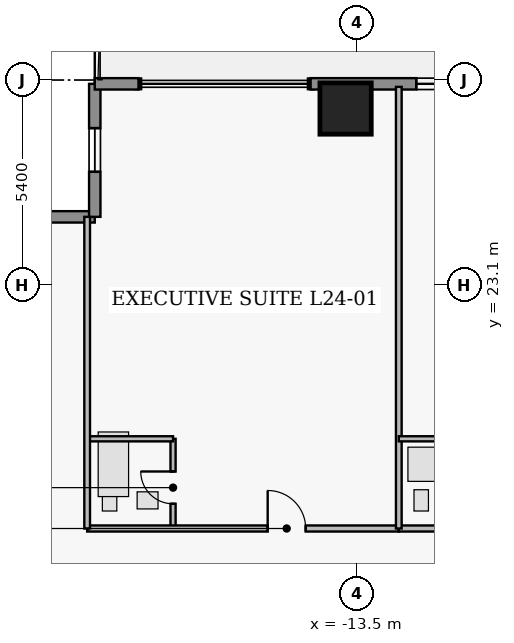
"""IFC4 building model, lengths in metres.
Left out: names, types, materials, properties, quantities, classifications, styles, units other than length and angle.
Written with IfcOpenShell. Run it as: python <this file> out.ifc"""

import sys

from ifc_helpers import new_model, si_unit, direction, frame, frame_2d, origin, origin_2d, place, context, subcontext, project, spatial, rectangle, extrude, element, fill, save


model = new_model("IFC4")
c1 = context("Model", 3, precision=1e-05, world=origin(), true_north=direction((0.0, 1.0)))
c2 = subcontext(c1, "Body", "Model", "MODEL_VIEW")
j1 = project(units=[si_unit("LENGTHUNIT", "METRE"), si_unit("PLANEANGLEUNIT", "RADIAN")], contexts=[c1])
p1 = place(None, origin())
s1 = spatial("IfcSite", under=j1, at=p1, CompositionType="ELEMENT")
p2 = place(p1, origin())
s2 = spatial("IfcBuilding", under=s1, at=p2, CompositionType="ELEMENT")
p3 = place(p2, frame((0.0, 0.0, 99.3)))
s3 = spatial("IfcBuildingStorey", under=s2, at=p3, CompositionType="ELEMENT", Elevation=99.3)
p4 = place(p3, frame((-13.8, 27.75, 0.0), z_axis=(0.0, 0.0, 1.0), x_axis=(1.0, 0.0, 0.0)))
e1 = element("IfcColumn", 1, at=p4, inside=s3, PredefinedType="COLUMN", context=c2, shape_type="SweptSolid", body=[
    extrude(rectangle(XDim=1.35, YDim=1.35, at=origin_2d()), origin(), (0.0, 0.0, 1.0), 3.65),
])
p5 = place(p3, frame((-23.9, 24.9, 0.0), z_axis=(0.0, 0.0, 1.0), x_axis=(1.0, 0.0, 0.0)))
e2 = element("IfcWall", 2, at=p5, inside=s3, PredefinedType="STANDARD", context=c2, shape_type="SweptSolid", body=[
    extrude(rectangle(XDim=3.5, YDim=0.3, at=frame_2d((1.75, 0.0))), origin(), (0.0, 0.0, 1.0), 3.43),
])
p6 = place(p5, frame((1.065, 0.0, 1.25)))
e3 = element("IfcOpeningElement", 3, at=p6, cuts=e2, PredefinedType="OPENING", context=c2, shape_type="SweptSolid", body=[
    extrude(rectangle(XDim=1.15, YDim=1.55, at=frame_2d((0.575, 0.775))), frame((0.0, 0.16, 0.0), z_axis=(0.0, -1.0, 0.0), x_axis=(1.0, 0.0, 0.0)), (0.0, 0.0, 1.0), 0.32),
])
p7 = place(p3, frame((-20.4, 24.9, 0.0), z_axis=(0.0, 0.0, 1.0), x_axis=(0.0, 1.0, 0.0)))
e4 = element("IfcWall", 4, at=p7, inside=s3, PredefinedType="STANDARD", context=c2, shape_type="SweptSolid", body=[
    extrude(rectangle(XDim=3.5, YDim=0.3, at=frame_2d((1.75, 0.0))), origin(), (0.0, 0.0, 1.0), 3.43),
])
p8 = place(p7, frame((1.185, 0.0, 1.25)))
e5 = element("IfcOpeningElement", 5, at=p8, cuts=e4, PredefinedType="OPENING", context=c2, shape_type="SweptSolid", body=[
    extrude(rectangle(XDim=1.15, YDim=1.55, at=frame_2d((0.575, 0.775))), frame((0.0, 0.16, 0.0), z_axis=(0.0, -1.0, 0.0), x_axis=(1.0, 0.0, 0.0)), (0.0, 0.0, 1.0), 0.32),
])
p9 = place(p3, frame((-20.4, 28.4, 0.0), z_axis=(0.0, 0.0, 1.0), x_axis=(1.0, 0.0, 0.0)))
e6 = element("IfcWall", 6, at=p9, inside=s3, PredefinedType="STANDARD", context=c2, shape_type="SweptSolid", body=[
    extrude(rectangle(XDim=1.15, YDim=0.3, at=frame_2d((0.575, 0.0))), origin(), (0.0, 0.0, 1.0), 3.43),
])
p10 = place(p3, frame((-14.72, 28.4, 0.0), z_axis=(0.0, 0.0, 1.0), x_axis=(1.0, 0.0, 0.0)))
e7 = element("IfcWall", 7, at=p10, inside=s3, PredefinedType="STANDARD", context=c2, shape_type="SweptSolid", body=[
    extrude(rectangle(XDim=11.04, YDim=0.3, at=frame_2d((5.52, 0.0))), origin(), (0.0, 0.0, 1.0), 3.43),
])
p11 = place(p10, frame((4.52, 0.0, 0.85)))
e8 = element("IfcOpeningElement", 8, at=p11, cuts=e7, PredefinedType="OPENING", context=c2, shape_type="SweptSolid", body=[
    extrude(rectangle(XDim=1.6, YDim=1.8, at=frame_2d((0.8, 0.9))), frame((0.0, 0.16, 0.0), z_axis=(0.0, -1.0, 0.0), x_axis=(1.0, 0.0, 0.0)), (0.0, 0.0, 1.0), 0.32),
])
p12 = place(p10, frame((2.78, 0.0, 0.95)))
e9 = element("IfcOpeningElement", 9, at=p12, cuts=e7, PredefinedType="OPENING", context=c2, shape_type="SweptSolid", body=[
    extrude(rectangle(XDim=1.15, YDim=1.55, at=frame_2d((0.575, 0.775))), frame((0.0, 0.16, 0.0), z_axis=(0.0, -1.0, 0.0), x_axis=(1.0, 0.0, 0.0)), (0.0, 0.0, 1.0), 0.32),
])
p13 = place(p10, frame((6.71, 0.0, 0.95)))
e10 = element("IfcOpeningElement", 10, at=p13, cuts=e7, PredefinedType="OPENING", context=c2, shape_type="SweptSolid", body=[
    extrude(rectangle(XDim=1.15, YDim=1.55, at=frame_2d((0.575, 0.775))), frame((0.0, 0.16, 0.0), z_axis=(0.0, -1.0, 0.0), x_axis=(1.0, 0.0, 0.0)), (0.0, 0.0, 1.0), 0.32),
])
p14 = place(p3, frame((-18.34, 16.7, 0.0), z_axis=(0.0, 0.0, 1.0), x_axis=(0.0, 1.0, 0.0)))
e11 = element("IfcWall", 11, at=p14, inside=s3, PredefinedType="PLUMBINGWALL", context=c2, shape_type="SweptSolid", body=[
    extrude(rectangle(XDim=2.36, YDim=0.135, at=frame_2d((1.18, 0.0))), origin(), (0.0, 0.0, 1.0), 3.43),
])
p15 = place(p14, frame((0.65, 0.0, 0.0)))
e12 = element("IfcOpeningElement", 12, at=p15, cuts=e11, PredefinedType="OPENING", context=c2, shape_type="SweptSolid", body=[
    extrude(rectangle(XDim=0.85, YDim=2.1, at=frame_2d((0.425, 1.05))), frame((0.0, 0.077, 0.0), z_axis=(0.0, -1.0, 0.0), x_axis=(1.0, 0.0, 0.0)), (0.0, 0.0, 1.0), 0.155),
])
p16 = place(p3, frame((-20.6, 16.7, 0.0), z_axis=(0.0, 0.0, 1.0), x_axis=(1.0, 0.0, 0.0)))
e13 = element("IfcWall", 13, at=p16, inside=s3, PredefinedType="PARTITIONING", context=c2, shape_type="SweptSolid", body=[
    extrude(rectangle(XDim=8.2, YDim=0.16, at=frame_2d((4.1, 0.0))), origin(), (0.0, 0.0, 1.0), 2.973),
])
p17 = place(p16, frame((4.75, 0.0, 0.0)))
e14 = element("IfcOpeningElement", 14, at=p17, cuts=e13, PredefinedType="OPENING", context=c2, shape_type="SweptSolid", body=[
    extrude(rectangle(XDim=1.0, YDim=2.15, at=frame_2d((0.5, 1.075))), frame((0.0, 0.09, 0.0), z_axis=(0.0, -1.0, 0.0), x_axis=(1.0, 0.0, 0.0)), (0.0, 0.0, 1.0), 0.18),
])
p18 = place(p3, frame((-12.4, 16.7, 0.0), z_axis=(0.0, 0.0, 1.0), x_axis=(1.0, 0.0, 0.0)))
e15 = element("IfcWall", 15, at=p18, inside=s3, PredefinedType="PARTITIONING", context=c2, shape_type="SweptSolid", body=[
    extrude(rectangle(XDim=6.0, YDim=0.16, at=frame_2d((3.0, 0.0))), origin(), (0.0, 0.0, 1.0), 2.973),
])
p19 = place(p18, frame((3.65, 0.0, 0.0)))
e16 = element("IfcOpeningElement", 16, at=p19, cuts=e15, PredefinedType="OPENING", context=c2, shape_type="SweptSolid", body=[
    extrude(rectangle(XDim=1.0, YDim=2.15, at=frame_2d((0.5, 1.075))), frame((0.0, 0.09, 0.0), z_axis=(0.0, -1.0, 0.0), x_axis=(1.0, 0.0, 0.0)), (0.0, 0.0, 1.0), 0.18),
])
p20 = place(p3, frame((-20.6, 19.06, 0.0), z_axis=(0.0, 0.0, 1.0), x_axis=(1.0, 0.0, 0.0)))
e17 = element("IfcWall", 17, at=p20, inside=s3, PredefinedType="PLUMBINGWALL", context=c2, shape_type="SweptSolid", body=[
    extrude(rectangle(XDim=2.26, YDim=0.135, at=frame_2d((1.13, 0.0))), origin(), (0.0, 0.0, 1.0), 3.43),
])
p21 = place(p3, frame((-20.6, 16.7, 0.0), z_axis=(0.0, 0.0, 1.0), x_axis=(0.0, 1.0, 0.0)))
e18 = element("IfcWall", 18, at=p21, inside=s3, PredefinedType="PARTITIONING", context=c2, shape_type="SweptSolid", body=[
    extrude(rectangle(XDim=8.2, YDim=0.15, at=frame_2d((4.1, 0.0))), origin(), (0.0, 0.0, 1.0), 3.43),
])
p22 = place(p3, frame((-12.4, 16.7, 0.0), z_axis=(0.0, 0.0, 1.0), x_axis=(0.0, 1.0, 0.0)))
e19 = element("IfcWall", 19, at=p22, inside=s3, PredefinedType="PARTITIONING", context=c2, shape_type="SweptSolid", body=[
    extrude(rectangle(XDim=11.62, YDim=0.15, at=frame_2d((5.81, 0.0))), origin(), (0.0, 0.0, 1.0), 3.43),
])
p23 = place(p3, frame((-12.4, 19.06, 0.0), z_axis=(0.0, 0.0, 1.0), x_axis=(1.0, 0.0, 0.0)))
e20 = element("IfcWall", 20, at=p23, inside=s3, PredefinedType="PLUMBINGWALL", context=c2, shape_type="SweptSolid", body=[
    extrude(rectangle(XDim=2.26, YDim=0.135, at=frame_2d((1.13, 0.0))), origin(), (0.0, 0.0, 1.0), 2.973),
])
p24 = place(p8, origin())
e21 = element("IfcWindow", 21, at=p24, inside=s3, PartitioningType="SINGLE_PANEL", PredefinedType="WINDOW", context=c2, shape_type="SweptSolid", body=[
    extrude(rectangle(XDim=1.15, YDim=1.55, at=frame_2d((0.575, 0.775))), frame((0.0, 0.03, 0.0), z_axis=(0.0, -1.0, 0.0), x_axis=(1.0, 0.0, 0.0)), (0.0, 0.0, 1.0), 0.06),
])
fill(e5, e21)
p25 = place(p12, origin())
e22 = element("IfcWindow", 22, at=p25, inside=s3, PartitioningType="SINGLE_PANEL", PredefinedType="WINDOW", context=c2, shape_type="SweptSolid", body=[
    extrude(rectangle(XDim=1.15, YDim=1.55, at=frame_2d((0.575, 0.775))), frame((0.0, 0.03, 0.0), z_axis=(0.0, -1.0, 0.0), x_axis=(1.0, 0.0, 0.0)), (0.0, 0.0, 1.0), 0.06),
])
fill(e9, e22)
p26 = place(p15, origin())
e23 = element("IfcDoor", 23, at=p26, inside=s3, OperationType="SINGLE_SWING_RIGHT", PredefinedType="DOOR", context=c2, shape_type="SweptSolid", body=[
    extrude(rectangle(XDim=0.85, YDim=2.1, at=frame_2d((0.425, 1.05))), frame((0.0, 0.025, 0.0), z_axis=(0.0, -1.0, 0.0), x_axis=(1.0, 0.0, 0.0)), (0.0, 0.0, 1.0), 0.05),
])
fill(e12, e23)
p27 = place(p17, origin())
e24 = element("IfcDoor", 24, at=p27, inside=s3, OperationType="SINGLE_SWING_LEFT", PredefinedType="DOOR", context=c2, shape_type="SweptSolid", body=[
    extrude(rectangle(XDim=1.0, YDim=2.15, at=frame_2d((0.5, 1.075))), frame((0.0, 0.025, 0.0), z_axis=(0.0, -1.0, 0.0), x_axis=(1.0, 0.0, 0.0)), (0.0, 0.0, 1.0), 0.05),
])
fill(e14, e24)
save(model, sys.argv[1])
